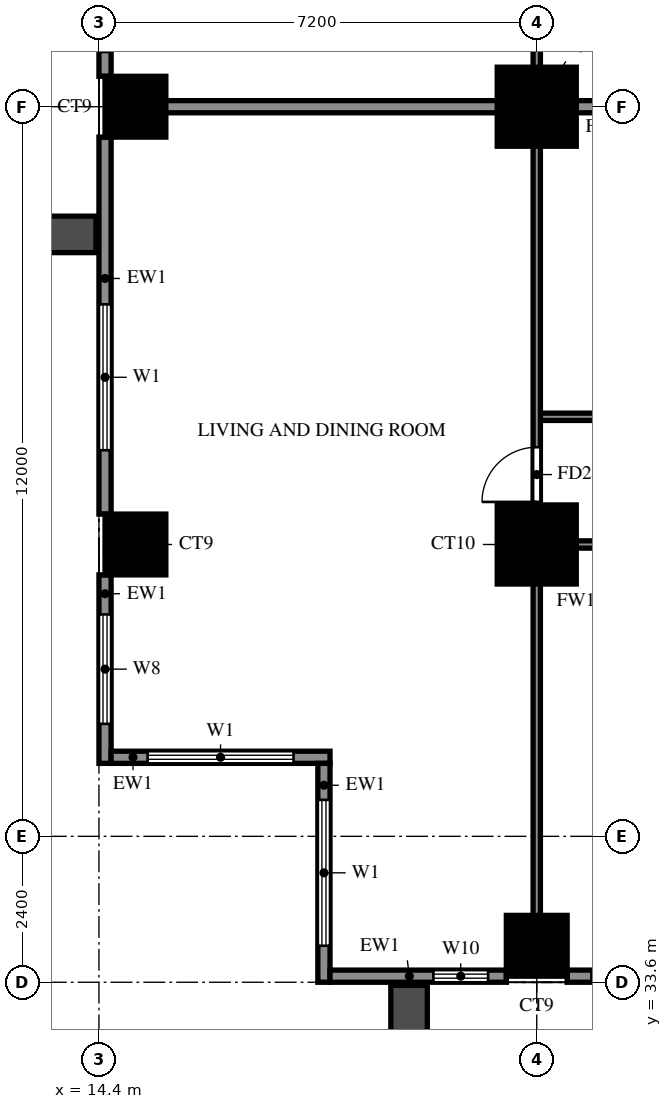
"""IFC4 building model, lengths in metres.
Left out: names, types, materials, properties, quantities, classifications, styles, units other than length and angle.
Written with IfcOpenShell. Run it as: python <this file> out.ifc"""

import sys

from ifc_helpers import new_model, si_unit, direction, frame, frame_2d, origin, origin_2d, place, context, subcontext, project, spatial, rectangle, extrude, source, transform, mapped, element, fill, save


model = new_model("IFC4")
c1 = context("Model", 3, precision=1e-05, world=origin(), true_north=direction((0.0, 1.0)))
c2 = subcontext(c1, "Body", "Model", "MODEL_VIEW")
j1 = project(units=[si_unit("LENGTHUNIT", "METRE"), si_unit("PLANEANGLEUNIT", "RADIAN")], contexts=[c1])
p1 = place(None, origin())
s1 = spatial("IfcSite", under=j1, at=p1, CompositionType="ELEMENT")
p2 = place(p1, origin())
s2 = spatial("IfcBuilding", under=s1, at=p2, CompositionType="ELEMENT")
p3 = place(p2, frame((0.0, 0.0, 76.0)))
s3 = spatial("IfcBuildingStorey", under=s2, at=p3, CompositionType="ELEMENT", Elevation=76.0)
m1 = source(origin(), c2, "Body", "SweptSolid", [
    extrude(rectangle(XDim=1.0, YDim=1.0, at=origin_2d()), origin(), (0.0, 0.0, 1.0), 3.18),
])
for number, where, z_axis, x_axis in (
    (1, (21.6, 34.2, 0.0), (0.0, 0.0, 1.0), (1.0, 0.0, 0.0)),
    (2, (15.0, 40.8, 0.0), (0.0, 0.0, 1.0), (1.0, 0.0, 0.0)),
):
    element("IfcColumn", number, at=place(p3, frame(where, z_axis=z_axis, x_axis=x_axis)), inside=s3, PredefinedType="COLUMN", context=c2, shape_type="MappedRepresentation", body=[
        mapped(m1, transform((0.0, 0.0, 0.0))),
    ])
m2 = source(origin(), c2, "Body", "SweptSolid", [
    extrude(rectangle(XDim=1.3, YDim=1.3, at=origin_2d()), origin(), (0.0, 0.0, 1.0), 3.18),
])
p4 = place(p3, frame((21.6, 40.8, 0.0), z_axis=(0.0, 0.0, 1.0), x_axis=(1.0, 0.0, 0.0)))
e3 = element("IfcColumn", 3, at=p4, inside=s3, PredefinedType="COLUMN", context=c2, shape_type="MappedRepresentation", body=[
    mapped(m2, transform((0.0, 0.0, 0.0))),
])
p5 = place(p3, frame((15.0, 48.0, 0.0), z_axis=(0.0, 0.0, 1.0), x_axis=(1.0, 0.0, 0.0)))
e4 = element("IfcColumn", 4, at=p5, inside=s3, PredefinedType="COLUMN", context=c2, shape_type="MappedRepresentation", body=[
    mapped(m1, transform((0.0, 0.0, 0.0))),
])
p6 = place(p3, frame((21.6, 48.0, 0.0), z_axis=(0.0, 0.0, 1.0), x_axis=(1.0, 0.0, 0.0)))
e5 = element("IfcColumn", 5, at=p6, inside=s3, PredefinedType="COLUMN", context=c2, shape_type="MappedRepresentation", body=[
    mapped(m2, transform((0.0, 0.0, 0.0))),
])
p7 = place(p3, frame((14.5, 54.7, 0.0), z_axis=(0.0, 0.0, 1.0), x_axis=(0.0, -1.0, 0.0)))
e6 = element("IfcWall", 6, at=p7, inside=s3, PredefinedType="SOLIDWALL", context=c2, shape_type="SweptSolid", body=[
    extrude(rectangle(XDim=6.2, YDim=0.2, at=frame_2d((3.1, 0.0))), origin(), (0.0, 0.0, 1.0), 3.18),
])
p8 = place(p7, frame((4.0, 0.0, 0.0)))
e7 = element("IfcOpeningElement", 7, at=p8, cuts=e6, PredefinedType="OPENING", context=c2, shape_type="SweptSolid", body=[
    extrude(rectangle(XDim=1.8, YDim=2.4, at=frame_2d((0.9, 1.2))), frame((0.0, 0.11, 0.0), z_axis=(0.0, -1.0, 0.0), x_axis=(1.0, 0.0, 0.0)), (0.0, 0.0, 1.0), 0.22),
])
p9 = place(p7, frame((0.45, 0.0, 0.6)))
e8 = element("IfcOpeningElement", 8, at=p9, cuts=e6, PredefinedType="OPENING", context=c2, shape_type="SweptSolid", body=[
    extrude(rectangle(XDim=1.2, YDim=2.4, at=frame_2d((0.6, 1.2))), frame((0.0, 0.11, 0.0), z_axis=(0.0, -1.0, 0.0), x_axis=(1.0, 0.0, 0.0)), (0.0, 0.0, 1.0), 0.22),
])
p10 = place(p7, frame((2.65, 0.0, 0.6)))
e9 = element("IfcOpeningElement", 9, at=p10, cuts=e6, PredefinedType="OPENING", context=c2, shape_type="SweptSolid", body=[
    extrude(rectangle(XDim=0.9, YDim=2.4, at=frame_2d((0.45, 1.2))), frame((0.0, 0.11, 0.0), z_axis=(0.0, -1.0, 0.0), x_axis=(1.0, 0.0, 0.0)), (0.0, 0.0, 1.0), 0.22),
])
p11 = place(p3, frame((14.5, 47.5, 0.0), z_axis=(0.0, 0.0, 1.0), x_axis=(0.0, -1.0, 0.0)))
e10 = element("IfcWall", 10, at=p11, inside=s3, PredefinedType="SOLIDWALL", context=c2, shape_type="SweptSolid", body=[
    extrude(rectangle(XDim=6.2, YDim=0.2, at=frame_2d((3.1, 0.0))), origin(), (0.0, 0.0, 1.0), 3.18),
])
p12 = place(p11, frame((2.75, 0.0, 0.6)))
e11 = element("IfcOpeningElement", 11, at=p12, cuts=e10, PredefinedType="OPENING", context=c2, shape_type="SweptSolid", body=[
    extrude(rectangle(XDim=2.4, YDim=2.4, at=frame_2d((1.2, 1.2))), frame((0.0, 0.11, 0.0), z_axis=(0.0, -1.0, 0.0), x_axis=(1.0, 0.0, 0.0)), (0.0, 0.0, 1.0), 0.22),
])
p13 = place(p3, frame((14.5, 40.3, 0.0), z_axis=(0.0, 0.0, 1.0), x_axis=(0.0, -1.0, 0.0)))
e12 = element("IfcWall", 12, at=p13, inside=s3, PredefinedType="SOLIDWALL", context=c2, shape_type="SweptSolid", body=[
    extrude(rectangle(XDim=3.1, YDim=0.2, at=frame_2d((1.55, 0.0))), origin(), (0.0, 0.0, 1.0), 3.18),
])
p14 = place(p13, frame((0.65, 0.0, 0.6)))
e13 = element("IfcOpeningElement", 13, at=p14, cuts=e12, PredefinedType="OPENING", context=c2, shape_type="SweptSolid", body=[
    extrude(rectangle(XDim=1.8, YDim=2.4, at=frame_2d((0.9, 1.2))), frame((0.0, 0.11, 0.0), z_axis=(0.0, -1.0, 0.0), x_axis=(1.0, 0.0, 0.0)), (0.0, 0.0, 1.0), 0.22),
])
p15 = place(p3, frame((14.6, 37.3, 0.0), z_axis=(0.0, 0.0, 1.0), x_axis=(1.0, 0.0, 0.0)))
e14 = element("IfcWall", 14, at=p15, inside=s3, PredefinedType="SOLIDWALL", context=c2, shape_type="SweptSolid", body=[
    extrude(rectangle(XDim=3.6, YDim=0.2, at=frame_2d((1.8, 0.0))), origin(), (0.0, 0.0, 1.0), 3.18),
])
p16 = place(p15, frame((0.6, 0.0, 0.6)))
e15 = element("IfcOpeningElement", 15, at=p16, cuts=e14, PredefinedType="OPENING", context=c2, shape_type="SweptSolid", body=[
    extrude(rectangle(XDim=2.4, YDim=2.4, at=frame_2d((1.2, 1.2))), frame((0.0, 0.11, 0.0), z_axis=(0.0, -1.0, 0.0), x_axis=(1.0, 0.0, 0.0)), (0.0, 0.0, 1.0), 0.22),
])
p17 = place(p3, frame((18.1, 37.2, 0.0), z_axis=(0.0, 0.0, 1.0), x_axis=(0.0, -1.0, 0.0)))
e16 = element("IfcWall", 16, at=p17, inside=s3, PredefinedType="SOLIDWALL", context=c2, shape_type="SweptSolid", body=[
    extrude(rectangle(XDim=3.6, YDim=0.2, at=frame_2d((1.8, 0.0))), origin(), (0.0, 0.0, 1.0), 3.18),
])
p18 = place(p17, frame((0.6, 0.0, 0.6)))
e17 = element("IfcOpeningElement", 17, at=p18, cuts=e16, PredefinedType="OPENING", context=c2, shape_type="SweptSolid", body=[
    extrude(rectangle(XDim=2.4, YDim=2.4, at=frame_2d((1.2, 1.2))), frame((0.0, 0.11, 0.0), z_axis=(0.0, -1.0, 0.0), x_axis=(1.0, 0.0, 0.0)), (0.0, 0.0, 1.0), 0.22),
])
p19 = place(p3, frame((18.2, 33.7, 0.0), z_axis=(0.0, 0.0, 1.0), x_axis=(1.0, 0.0, 0.0)))
e18 = element("IfcWall", 18, at=p19, inside=s3, PredefinedType="SOLIDWALL", context=c2, shape_type="SweptSolid", body=[
    extrude(rectangle(XDim=2.9, YDim=0.2, at=frame_2d((1.45, 0.0))), origin(), (0.0, 0.0, 1.0), 3.18),
])
p20 = place(p19, frame((1.7, 0.0, 0.6)))
e19 = element("IfcOpeningElement", 19, at=p20, cuts=e18, PredefinedType="OPENING", context=c2, shape_type="SweptSolid", body=[
    extrude(rectangle(XDim=0.9, YDim=2.4, at=frame_2d((0.45, 1.2))), frame((0.0, 0.11, 0.0), z_axis=(0.0, -1.0, 0.0), x_axis=(1.0, 0.0, 0.0)), (0.0, 0.0, 1.0), 0.22),
])
p21 = place(p3, frame((22.1, 33.7, 0.0), z_axis=(0.0, 0.0, 1.0), x_axis=(1.0, 0.0, 0.0)))
e20 = element("IfcWall", 20, at=p21, inside=s3, PredefinedType="SOLIDWALL", context=c2, shape_type="SweptSolid", body=[
    extrude(rectangle(XDim=6.2, YDim=0.2, at=frame_2d((3.1, 0.0))), origin(), (0.0, 0.0, 1.0), 3.18),
])
p22 = place(p21, frame((0.4, 0.0, 0.0)))
e21 = element("IfcOpeningElement", 21, at=p22, cuts=e20, PredefinedType="OPENING", context=c2, shape_type="SweptSolid", body=[
    extrude(rectangle(XDim=1.8, YDim=2.4, at=frame_2d((0.9, 1.2))), frame((0.0, 0.11, 0.0), z_axis=(0.0, -1.0, 0.0), x_axis=(1.0, 0.0, 0.0)), (0.0, 0.0, 1.0), 0.22),
])
p23 = place(p21, frame((4.7, 0.0, 1.5)))
e22 = element("IfcOpeningElement", 22, at=p23, cuts=e20, PredefinedType="OPENING", context=c2, shape_type="SweptSolid", body=[
    extrude(rectangle(XDim=0.9, YDim=0.9, at=frame_2d((0.45, 0.45))), frame((0.0, 0.11, 0.0), z_axis=(0.0, -1.0, 0.0), x_axis=(1.0, 0.0, 0.0)), (0.0, 0.0, 1.0), 0.22),
])
for number, where, z_axis, x_axis in (
    (23, (14.35, 45.9, 0.0), (0.0, 0.0, 1.0), (-1.0, 0.0, 0.0)),
    (24, (19.5, 33.55, 0.0), (0.0, 0.0, 1.0), (0.0, -1.0, 0.0)),
):
    element("IfcWall", number, at=place(p3, frame(where, z_axis=z_axis, x_axis=x_axis)), inside=s3, PredefinedType="SOLIDWALL", context=c2, shape_type="SweptSolid", body=[
        extrude(rectangle(XDim=2.65, YDim=0.6, at=frame_2d((1.325, 0.0))), origin(), (0.0, 0.0, 1.0), 2.85),
    ])
p24 = place(p3, frame((14.525, 48.0, 0.0), z_axis=(0.0, 0.0, 1.0), x_axis=(1.0, 0.0, 0.0)))
e25 = element("IfcWall", 25, at=p24, inside=s3, PredefinedType="SOLIDWALL", context=c2, shape_type="SweptSolid", body=[
    extrude(rectangle(XDim=14.275, YDim=0.2, at=frame_2d((7.138, 0.0))), origin(), (0.0, 0.0, 1.0), 3.18),
])
p25 = place(p3, frame((21.6, 40.8, 0.0), z_axis=(0.0, 0.0, 1.0), x_axis=(1.0, 0.0, 0.0)))
e26 = element("IfcWall", 26, at=p25, inside=s3, PredefinedType="PARTITIONING", context=c2, shape_type="SweptSolid", body=[
    extrude(rectangle(XDim=3.6, YDim=0.12, at=frame_2d((1.8, 0.0))), origin(), (0.0, 0.0, 1.0), 3.18),
])
p26 = place(p25, frame((1.35, 0.0, 0.0)))
e27 = element("IfcOpeningElement", 27, at=p26, cuts=e26, PredefinedType="OPENING", context=c2, shape_type="SweptSolid", body=[
    extrude(rectangle(XDim=0.9, YDim=2.1, at=frame_2d((0.45, 1.05))), frame((0.0, 0.07, 0.0), z_axis=(0.0, -1.0, 0.0), x_axis=(1.0, 0.0, 0.0)), (0.0, 0.0, 1.0), 0.14),
])
p27 = place(p3, frame((21.6, 42.9, 0.0), z_axis=(0.0, 0.0, 1.0), x_axis=(1.0, 0.0, 0.0)))
e28 = element("IfcWall", 28, at=p27, inside=s3, PredefinedType="PARTITIONING", context=c2, shape_type="SweptSolid", body=[
    extrude(rectangle(XDim=12.0, YDim=0.12, at=frame_2d((6.0, 0.0))), origin(), (0.0, 0.0, 1.0), 3.18),
])
p28 = place(p27, frame((2.1, 0.0, 0.0)))
e29 = element("IfcOpeningElement", 29, at=p28, cuts=e28, PredefinedType="OPENING", context=c2, shape_type="SweptSolid", body=[
    extrude(rectangle(XDim=0.9, YDim=2.1, at=frame_2d((0.45, 1.05))), frame((0.0, 0.07, 0.0), z_axis=(0.0, -1.0, 0.0), x_axis=(1.0, 0.0, 0.0)), (0.0, 0.0, 1.0), 0.14),
])
p29 = place(p27, frame((6.55, 0.0, 0.0)))
e30 = element("IfcOpeningElement", 30, at=p29, cuts=e28, PredefinedType="OPENING", context=c2, shape_type="SweptSolid", body=[
    extrude(rectangle(XDim=0.9, YDim=2.1, at=frame_2d((0.45, 1.05))), frame((0.0, 0.07, 0.0), z_axis=(0.0, -1.0, 0.0), x_axis=(1.0, 0.0, 0.0)), (0.0, 0.0, 1.0), 0.14),
])
p30 = place(p27, frame((10.0, 0.0, 0.0)))
e31 = element("IfcOpeningElement", 31, at=p30, cuts=e28, PredefinedType="OPENING", context=c2, shape_type="SweptSolid", body=[
    extrude(rectangle(XDim=0.9, YDim=2.1, at=frame_2d((0.45, 1.05))), frame((0.0, 0.07, 0.0), z_axis=(0.0, -1.0, 0.0), x_axis=(1.0, 0.0, 0.0)), (0.0, 0.0, 1.0), 0.14),
])
p31 = place(p3, frame((21.6, 33.725, 0.0), z_axis=(0.0, 0.0, 1.0), x_axis=(0.0, 1.0, 0.0)))
e32 = element("IfcWall", 32, at=p31, inside=s3, PredefinedType="PARTITIONING", context=c2, shape_type="SweptSolid", body=[
    extrude(rectangle(XDim=39.475, YDim=0.12, at=frame_2d((19.737, 0.0))), origin(), (0.0, 0.0, 1.0), 3.18),
])
p32 = place(p31, frame((7.775, 0.0, 0.0)))
e33 = element("IfcOpeningElement", 33, at=p32, cuts=e32, PredefinedType="OPENING", context=c2, shape_type="SweptSolid", body=[
    extrude(rectangle(XDim=0.9, YDim=2.1, at=frame_2d((0.45, 1.05))), frame((0.0, 0.07, 0.0), z_axis=(0.0, -1.0, 0.0), x_axis=(1.0, 0.0, 0.0)), (0.0, 0.0, 1.0), 0.14),
])
p33 = place(p31, frame((17.125, 0.0, 0.0)))
e34 = element("IfcOpeningElement", 34, at=p33, cuts=e32, PredefinedType="OPENING", context=c2, shape_type="SweptSolid", body=[
    extrude(rectangle(XDim=1.5, YDim=2.1, at=frame_2d((0.75, 1.05))), frame((0.0, 0.07, 0.0), z_axis=(0.0, -1.0, 0.0), x_axis=(1.0, 0.0, 0.0)), (0.0, 0.0, 1.0), 0.14),
])
p34 = place(p31, frame((22.825, 0.0, 0.0)))
e35 = element("IfcOpeningElement", 35, at=p34, cuts=e32, PredefinedType="OPENING", context=c2, shape_type="SweptSolid", body=[
    extrude(rectangle(XDim=0.9, YDim=2.1, at=frame_2d((0.45, 1.05))), frame((0.0, 0.07, 0.0), z_axis=(0.0, -1.0, 0.0), x_axis=(1.0, 0.0, 0.0)), (0.0, 0.0, 1.0), 0.14),
])
p35 = place(p31, frame((26.425, 0.0, 0.0)))
e36 = element("IfcOpeningElement", 36, at=p35, cuts=e32, PredefinedType="OPENING", context=c2, shape_type="SweptSolid", body=[
    extrude(rectangle(XDim=0.9, YDim=2.1, at=frame_2d((0.45, 1.05))), frame((0.0, 0.07, 0.0), z_axis=(0.0, -1.0, 0.0), x_axis=(1.0, 0.0, 0.0)), (0.0, 0.0, 1.0), 0.14),
])
p36 = place(p31, frame((30.025, 0.0, 0.0)))
e37 = element("IfcOpeningElement", 37, at=p36, cuts=e32, PredefinedType="OPENING", context=c2, shape_type="SweptSolid", body=[
    extrude(rectangle(XDim=0.9, YDim=2.1, at=frame_2d((0.45, 1.05))), frame((0.0, 0.07, 0.0), z_axis=(0.0, -1.0, 0.0), x_axis=(1.0, 0.0, 0.0)), (0.0, 0.0, 1.0), 0.14),
])
p37 = place(p31, frame((33.625, 0.0, 0.0)))
e38 = element("IfcOpeningElement", 38, at=p37, cuts=e32, PredefinedType="OPENING", context=c2, shape_type="SweptSolid", body=[
    extrude(rectangle(XDim=0.9, YDim=2.1, at=frame_2d((0.45, 1.05))), frame((0.0, 0.07, 0.0), z_axis=(0.0, -1.0, 0.0), x_axis=(1.0, 0.0, 0.0)), (0.0, 0.0, 1.0), 0.14),
])
p38 = place(p31, frame((37.225, 0.0, 0.0)))
e39 = element("IfcOpeningElement", 39, at=p38, cuts=e32, PredefinedType="OPENING", context=c2, shape_type="SweptSolid", body=[
    extrude(rectangle(XDim=0.9, YDim=2.1, at=frame_2d((0.45, 1.05))), frame((0.0, 0.07, 0.0), z_axis=(0.0, -1.0, 0.0), x_axis=(1.0, 0.0, 0.0)), (0.0, 0.0, 1.0), 0.14),
])
p39 = place(p12, origin())
e40 = element("IfcWindow", 40, at=p39, inside=s3, PartitioningType="DOUBLE_PANEL_VERTICAL", PredefinedType="WINDOW", context=c2, shape_type="SweptSolid", body=[
    extrude(rectangle(XDim=2.4, YDim=2.4, at=frame_2d((1.2, 1.2))), frame((0.0, 0.03, 0.0), z_axis=(0.0, -1.0, 0.0), x_axis=(1.0, 0.0, 0.0)), (0.0, 0.0, 1.0), 0.06),
])
fill(e11, e40)
p40 = place(p14, origin())
e41 = element("IfcWindow", 41, at=p40, inside=s3, PartitioningType="DOUBLE_PANEL_VERTICAL", PredefinedType="WINDOW", context=c2, shape_type="SweptSolid", body=[
    extrude(rectangle(XDim=1.8, YDim=2.4, at=frame_2d((0.9, 1.2))), frame((0.0, 0.03, 0.0), z_axis=(0.0, -1.0, 0.0), x_axis=(1.0, 0.0, 0.0)), (0.0, 0.0, 1.0), 0.06),
])
fill(e13, e41)
p41 = place(p16, origin())
e42 = element("IfcWindow", 42, at=p41, inside=s3, PartitioningType="DOUBLE_PANEL_VERTICAL", PredefinedType="WINDOW", context=c2, shape_type="SweptSolid", body=[
    extrude(rectangle(XDim=2.4, YDim=2.4, at=frame_2d((1.2, 1.2))), frame((0.0, 0.03, 0.0), z_axis=(0.0, -1.0, 0.0), x_axis=(1.0, 0.0, 0.0)), (0.0, 0.0, 1.0), 0.06),
])
fill(e15, e42)
p42 = place(p18, origin())
e43 = element("IfcWindow", 43, at=p42, inside=s3, PartitioningType="DOUBLE_PANEL_VERTICAL", PredefinedType="WINDOW", context=c2, shape_type="SweptSolid", body=[
    extrude(rectangle(XDim=2.4, YDim=2.4, at=frame_2d((1.2, 1.2))), frame((0.0, 0.03, 0.0), z_axis=(0.0, -1.0, 0.0), x_axis=(1.0, 0.0, 0.0)), (0.0, 0.0, 1.0), 0.06),
])
fill(e17, e43)
p43 = place(p20, origin())
e44 = element("IfcWindow", 44, at=p43, inside=s3, PartitioningType="SINGLE_PANEL", PredefinedType="WINDOW", context=c2, shape_type="SweptSolid", body=[
    extrude(rectangle(XDim=0.9, YDim=2.4, at=frame_2d((0.45, 1.2))), frame((0.0, 0.03, 0.0), z_axis=(0.0, -1.0, 0.0), x_axis=(1.0, 0.0, 0.0)), (0.0, 0.0, 1.0), 0.06),
])
fill(e19, e44)
p44 = place(p22, origin())
e45 = element("IfcDoor", 45, at=p44, inside=s3, OperationType="DOUBLE_DOOR_SLIDING", PredefinedType="DOOR", context=c2, shape_type="SweptSolid", body=[
    extrude(rectangle(XDim=1.8, YDim=2.4, at=frame_2d((0.9, 1.2))), frame((0.0, 0.025, 0.0), z_axis=(0.0, -1.0, 0.0), x_axis=(1.0, 0.0, 0.0)), (0.0, 0.0, 1.0), 0.05),
])
fill(e21, e45)
p45 = place(p32, origin())
e46 = element("IfcDoor", 46, at=p45, inside=s3, OperationType="SINGLE_SWING_RIGHT", PredefinedType="DOOR", context=c2, shape_type="SweptSolid", body=[
    extrude(rectangle(XDim=0.9, YDim=2.1, at=frame_2d((0.45, 1.05))), frame((0.0, 0.025, 0.0), z_axis=(0.0, -1.0, 0.0), x_axis=(1.0, 0.0, 0.0)), (0.0, 0.0, 1.0), 0.05),
])
fill(e33, e46)
save(model, sys.argv[1])
